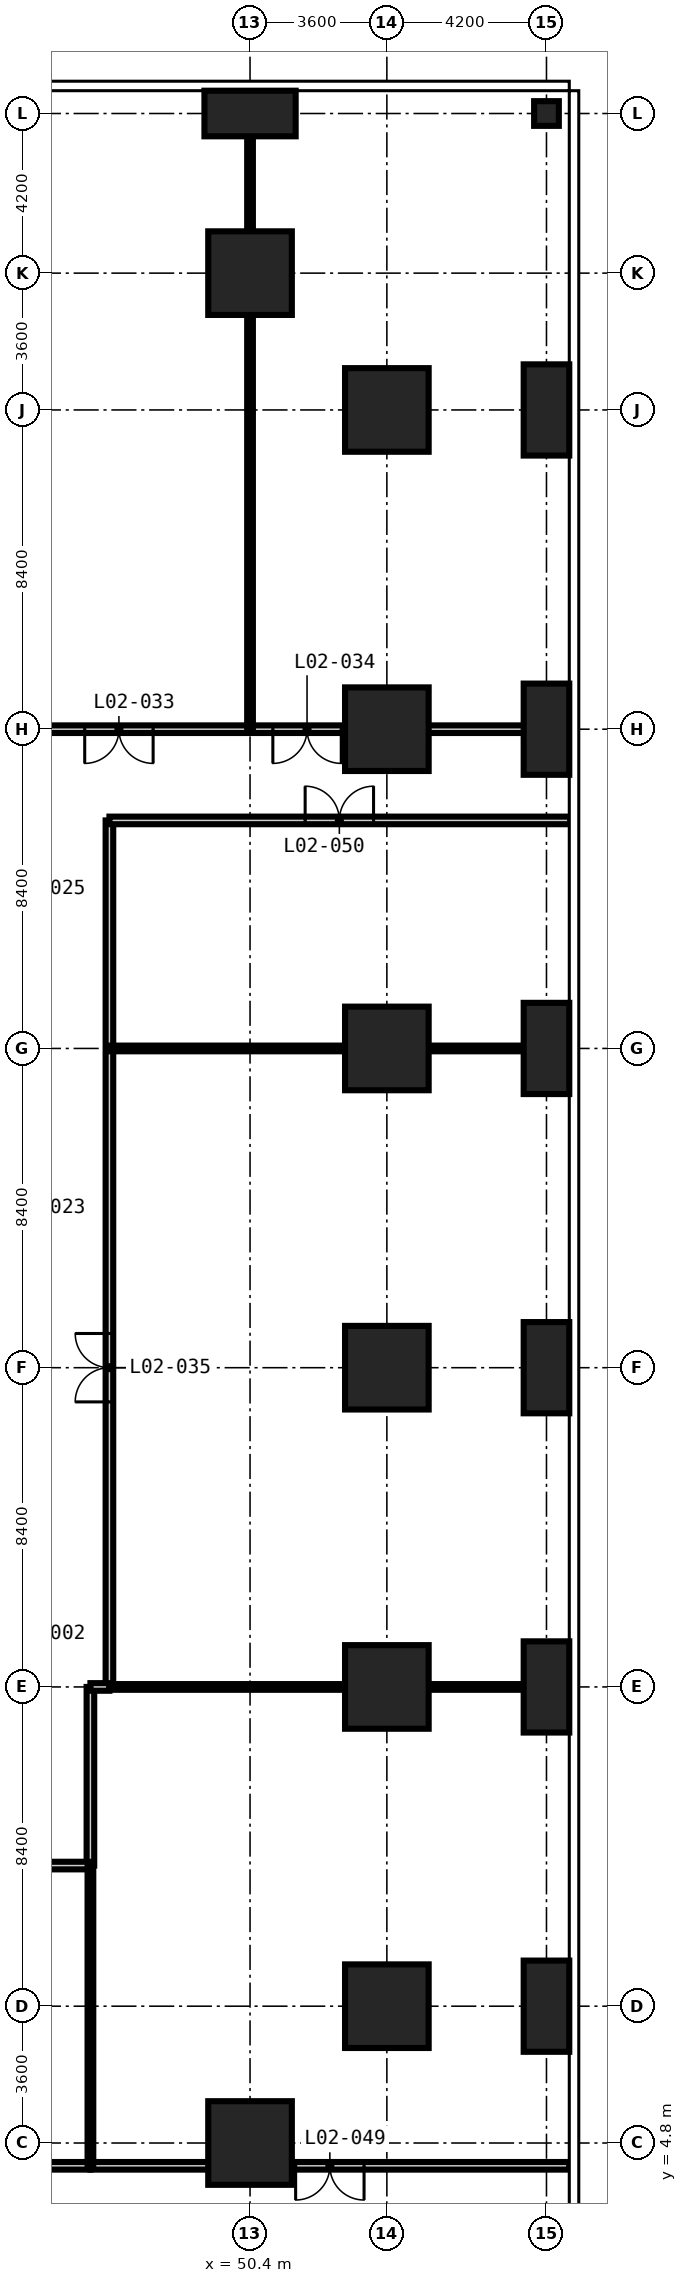
"""IFC4 building model, lengths in metres.
Left out: names, types, materials, properties, quantities, classifications, styles, units other than length and angle.
Written with IfcOpenShell. Run it as: python <this file> out.ifc"""

import sys

from ifc_helpers import new_model, si_unit, direction, frame, frame_2d, origin, origin_2d, place, context, subcontext, project, spatial, rectangle, extrude, element, fill, save


model = new_model("IFC4")
c1 = context("Model", 3, precision=1e-05, world=origin(), true_north=direction((0.0, 1.0)))
c2 = subcontext(c1, "Body", "Model", "MODEL_VIEW")
j1 = project(units=[si_unit("LENGTHUNIT", "METRE"), si_unit("PLANEANGLEUNIT", "RADIAN")], contexts=[c1])
p1 = place(None, origin())
s1 = spatial("IfcSite", under=j1, at=p1, CompositionType="ELEMENT")
p2 = place(p1, origin())
s2 = spatial("IfcBuilding", under=s1, at=p2, CompositionType="ELEMENT")
p3 = place(p2, frame((0.0, 0.0, 12.0)))
s3 = spatial("IfcBuildingStorey", under=s2, at=p3, CompositionType="ELEMENT", Elevation=12.0)
for number, where, z_axis, x_axis in (
    (1, (50.4, 4.8, -0.3), (0.0, 0.0, 1.0), (1.0, 0.0, 0.0)),
    (2, (50.4, 54.0, -0.3), (0.0, 0.0, 1.0), (1.0, 0.0, 0.0)),
):
    element("IfcColumn", number, at=place(p3, frame(where, z_axis=z_axis, x_axis=x_axis)), inside=s3, PredefinedType="COLUMN", context=c2, shape_type="SweptSolid", body=[
        extrude(rectangle(XDim=2.2, YDim=2.2, at=origin_2d()), origin(), (0.0, 0.0, 1.0), 5.0),
    ])
p4 = place(p3, frame((50.4, 58.2, -0.3), z_axis=(0.0, 0.0, 1.0), x_axis=(1.0, 0.0, 0.0)))
e3 = element("IfcColumn", 3, at=p4, inside=s3, PredefinedType="COLUMN", context=c2, shape_type="SweptSolid", body=[
    extrude(rectangle(XDim=2.4, YDim=1.2, at=origin_2d()), origin(), (0.0, 0.0, 1.0), 5.0),
])
for number, where, z_axis, x_axis in (
    (4, (54.0, 8.4, -0.3), (0.0, 0.0, 1.0), (1.0, 0.0, 0.0)),
    (5, (54.0, 16.8, -0.3), (0.0, 0.0, 1.0), (1.0, 0.0, 0.0)),
    (6, (54.0, 25.2, -0.3), (0.0, 0.0, 1.0), (1.0, 0.0, 0.0)),
    (7, (54.0, 33.6, -0.3), (0.0, 0.0, 1.0), (1.0, 0.0, 0.0)),
    (8, (54.0, 42.0, -0.3), (0.0, 0.0, 1.0), (1.0, 0.0, 0.0)),
    (9, (54.0, 50.4, -0.3), (0.0, 0.0, 1.0), (1.0, 0.0, 0.0)),
):
    element("IfcColumn", number, at=place(p3, frame(where, z_axis=z_axis, x_axis=x_axis)), inside=s3, PredefinedType="COLUMN", context=c2, shape_type="SweptSolid", body=[
        extrude(rectangle(XDim=2.2, YDim=2.2, at=origin_2d()), origin(), (0.0, 0.0, 1.0), 5.0),
    ])
for number, where, z_axis, x_axis in (
    (10, (58.2, 8.4, -0.3), (0.0, 0.0, 1.0), (1.0, 0.0, 0.0)),
    (11, (58.2, 16.8, -0.3), (0.0, 0.0, 1.0), (1.0, 0.0, 0.0)),
    (12, (58.2, 25.2, -0.3), (0.0, 0.0, 1.0), (1.0, 0.0, 0.0)),
    (13, (58.2, 33.6, -0.3), (0.0, 0.0, 1.0), (1.0, 0.0, 0.0)),
    (14, (58.2, 42.0, -0.3), (0.0, 0.0, 1.0), (1.0, 0.0, 0.0)),
    (15, (58.2, 50.4, -0.3), (0.0, 0.0, 1.0), (1.0, 0.0, 0.0)),
):
    element("IfcColumn", number, at=place(p3, frame(where, z_axis=z_axis, x_axis=x_axis)), inside=s3, PredefinedType="COLUMN", context=c2, shape_type="SweptSolid", body=[
        extrude(rectangle(XDim=1.2, YDim=2.4, at=origin_2d()), origin(), (0.0, 0.0, 1.0), 5.0),
    ])
p5 = place(p3, frame((58.2, 58.2, -0.3), z_axis=(0.0, 0.0, 1.0), x_axis=(1.0, 0.0, 0.0)))
e16 = element("IfcColumn", 16, at=p5, inside=s3, PredefinedType="COLUMN", context=c2, shape_type="SweptSolid", body=[
    extrude(rectangle(XDim=0.65, YDim=0.65, at=origin_2d()), origin(), (0.0, 0.0, 1.0), 5.0),
])
p6 = place(p3, frame((46.2, 12.1, 0.0), z_axis=(0.0, 0.0, 1.0), x_axis=(0.0, 1.0, 0.0)))
e17 = element("IfcWall", 17, at=p6, inside=s3, PredefinedType="PARTITIONING", context=c2, shape_type="SweptSolid", body=[
    extrude(rectangle(XDim=4.7, YDim=0.2, at=frame_2d((2.35, 0.0))), origin(), (0.0, 0.0, 1.0), 4.7),
])
p7 = place(p3, frame((46.7, 16.8, 0.0), z_axis=(0.0, 0.0, 1.0), x_axis=(0.0, 1.0, 0.0)))
e18 = element("IfcWall", 18, at=p7, inside=s3, PredefinedType="PARTITIONING", context=c2, shape_type="SweptSolid", body=[
    extrude(rectangle(XDim=22.8, YDim=0.2, at=frame_2d((11.4, 0.0))), origin(), (0.0, 0.0, 1.0), 4.7),
])
p8 = place(p7, frame((7.5, 0.0, 0.0)))
e19 = element("IfcOpeningElement", 19, at=p8, cuts=e18, PredefinedType="OPENING", context=c2, shape_type="SweptSolid", body=[
    extrude(rectangle(XDim=1.8, YDim=2.4, at=frame_2d((0.9, 1.2))), frame((0.0, 0.11, 0.0), z_axis=(0.0, -1.0, 0.0), x_axis=(1.0, 0.0, 0.0)), (0.0, 0.0, 1.0), 0.22),
])
p9 = place(p3, frame((0.0, 4.2, 0.0), z_axis=(0.0, 0.0, 1.0), x_axis=(1.0, 0.0, 0.0)))
e20 = element("IfcWall", 20, at=p9, inside=s3, PredefinedType="PARTITIONING", context=c2, shape_type="SweptSolid", body=[
    extrude(rectangle(XDim=46.2, YDim=0.2, at=frame_2d((23.1, 0.0))), origin(), (0.0, 0.0, 1.0), 4.7),
])
p10 = place(p9, frame((5.8, 0.0, 0.0)))
e21 = element("IfcOpeningElement", 21, at=p10, cuts=e20, PredefinedType="OPENING", context=c2, shape_type="SweptSolid", body=[
    extrude(rectangle(XDim=1.0, YDim=2.1, at=frame_2d((0.5, 1.05))), frame((0.0, 0.11, 0.0), z_axis=(0.0, -1.0, 0.0), x_axis=(1.0, 0.0, 0.0)), (0.0, 0.0, 1.0), 0.22),
])
p11 = place(p9, frame((18.4, 0.0, 0.0)))
e22 = element("IfcOpeningElement", 22, at=p11, cuts=e20, PredefinedType="OPENING", context=c2, shape_type="SweptSolid", body=[
    extrude(rectangle(XDim=1.0, YDim=2.1, at=frame_2d((0.5, 1.05))), frame((0.0, 0.11, 0.0), z_axis=(0.0, -1.0, 0.0), x_axis=(1.0, 0.0, 0.0)), (0.0, 0.0, 1.0), 0.22),
])
p12 = place(p9, frame((28.9, 0.0, 0.0)))
e23 = element("IfcOpeningElement", 23, at=p12, cuts=e20, PredefinedType="OPENING", context=c2, shape_type="SweptSolid", body=[
    extrude(rectangle(XDim=1.0, YDim=2.1, at=frame_2d((0.5, 1.05))), frame((0.0, 0.11, 0.0), z_axis=(0.0, -1.0, 0.0), x_axis=(1.0, 0.0, 0.0)), (0.0, 0.0, 1.0), 0.22),
])
p13 = place(p9, frame((39.4, 0.0, 0.0)))
e24 = element("IfcOpeningElement", 24, at=p13, cuts=e20, PredefinedType="OPENING", context=c2, shape_type="SweptSolid", body=[
    extrude(rectangle(XDim=1.0, YDim=2.1, at=frame_2d((0.5, 1.05))), frame((0.0, 0.11, 0.0), z_axis=(0.0, -1.0, 0.0), x_axis=(1.0, 0.0, 0.0)), (0.0, 0.0, 1.0), 0.22),
])
p14 = place(p3, frame((12.6, 12.1, 0.0), z_axis=(0.0, 0.0, 1.0), x_axis=(1.0, 0.0, 0.0)))
e25 = element("IfcWall", 25, at=p14, inside=s3, PredefinedType="PARTITIONING", context=c2, shape_type="SweptSolid", body=[
    extrude(rectangle(XDim=33.6, YDim=0.2, at=frame_2d((16.8, 0.0))), origin(), (0.0, 0.0, 1.0), 4.7),
])
p15 = place(p3, frame((46.2, 16.8, 0.0), z_axis=(0.0, 0.0, 1.0), x_axis=(1.0, 0.0, 0.0)))
e26 = element("IfcWall", 26, at=p15, inside=s3, PredefinedType="PARTITIONING", context=c2, shape_type="SweptSolid", body=[
    extrude(rectangle(XDim=0.5, YDim=0.2, at=frame_2d((0.25, 0.0))), origin(), (0.0, 0.0, 1.0), 4.7),
])
p16 = place(p3, frame((46.7, 39.6, 0.0), z_axis=(0.0, 0.0, 1.0), x_axis=(1.0, 0.0, 0.0)))
e27 = element("IfcWall", 27, at=p16, inside=s3, PredefinedType="PARTITIONING", context=c2, shape_type="SweptSolid", body=[
    extrude(rectangle(XDim=12.123, YDim=0.2, at=frame_2d((6.062, 0.0))), origin(), (0.0, 0.0, 1.0), 4.7),
])
p17 = place(p16, frame((5.15, 0.0, 0.0)))
e28 = element("IfcOpeningElement", 28, at=p17, cuts=e27, PredefinedType="OPENING", context=c2, shape_type="SweptSolid", body=[
    extrude(rectangle(XDim=1.8, YDim=2.4, at=frame_2d((0.9, 1.2))), frame((0.0, 0.11, 0.0), z_axis=(0.0, -1.0, 0.0), x_axis=(1.0, 0.0, 0.0)), (0.0, 0.0, 1.0), 0.22),
])
p18 = place(p3, frame((58.8, 4.2, 0.0), z_axis=(0.0, 0.0, 1.0), x_axis=(-1.0, 0.0, 0.0)))
e29 = element("IfcWall", 29, at=p18, inside=s3, PredefinedType="PARTITIONING", context=c2, shape_type="SweptSolid", body=[
    extrude(rectangle(XDim=12.6, YDim=0.2, at=frame_2d((6.3, 0.0))), origin(), (0.0, 0.0, 1.0), 4.7),
])
p19 = place(p18, frame((5.4, 0.0, 0.0)))
e30 = element("IfcOpeningElement", 30, at=p19, cuts=e29, PredefinedType="OPENING", context=c2, shape_type="SweptSolid", body=[
    extrude(rectangle(XDim=1.8, YDim=2.4, at=frame_2d((0.9, 1.2))), frame((0.0, 0.11, 0.0), z_axis=(0.0, -1.0, 0.0), x_axis=(1.0, 0.0, 0.0)), (0.0, 0.0, 1.0), 0.22),
])
p20 = place(p3, frame((58.8, 42.0, 0.0), z_axis=(0.0, 0.0, 1.0), x_axis=(-1.0, 0.0, 0.0)))
e31 = element("IfcWall", 31, at=p20, inside=s3, PredefinedType="PARTITIONING", context=c2, shape_type="SweptSolid", body=[
    extrude(rectangle(XDim=15.3, YDim=0.2, at=frame_2d((7.65, 0.0))), origin(), (0.0, 0.0, 1.0), 4.7),
])
p21 = place(p20, frame((10.95, 0.0, 0.0)))
e32 = element("IfcOpeningElement", 32, at=p21, cuts=e31, PredefinedType="OPENING", context=c2, shape_type="SweptSolid", body=[
    extrude(rectangle(XDim=1.8, YDim=2.4, at=frame_2d((0.9, 1.2))), frame((0.0, 0.11, 0.0), z_axis=(0.0, -1.0, 0.0), x_axis=(1.0, 0.0, 0.0)), (0.0, 0.0, 1.0), 0.22),
])
p22 = place(p20, frame((6.0, 0.0, 0.0)))
e33 = element("IfcOpeningElement", 33, at=p22, cuts=e31, PredefinedType="OPENING", context=c2, shape_type="SweptSolid", body=[
    extrude(rectangle(XDim=1.8, YDim=2.4, at=frame_2d((0.9, 1.2))), frame((0.0, 0.11, 0.0), z_axis=(0.0, -1.0, 0.0), x_axis=(1.0, 0.0, 0.0)), (0.0, 0.0, 1.0), 0.22),
])
p23 = place(p3, frame((46.2, 4.2, 0.0), z_axis=(0.0, 0.0, 1.0), x_axis=(0.0, 1.0, 0.0)))
e34 = element("IfcWall", 34, at=p23, inside=s3, PredefinedType="PARTITIONING", context=c2, shape_type="SweptSolid", body=[
    extrude(rectangle(XDim=7.9, YDim=0.15, at=frame_2d((3.95, 0.0))), origin(), (0.0, 0.0, 1.0), 4.7),
])
p24 = place(p3, frame((50.4, 42.0, 0.0), z_axis=(0.0, 0.0, 1.0), x_axis=(0.0, 1.0, 0.0)))
e35 = element("IfcWall", 35, at=p24, inside=s3, PredefinedType="PARTITIONING", context=c2, shape_type="SweptSolid", body=[
    extrude(rectangle(XDim=16.8, YDim=0.15, at=frame_2d((8.4, 0.0))), origin(), (0.0, 0.0, 1.0), 4.7),
])
for number, where, z_axis, x_axis in (
    (36, (46.7, 16.8, 0.0), (0.0, 0.0, 1.0), (1.0, 0.0, 0.0)),
    (37, (46.7, 33.6, 0.0), (0.0, 0.0, 1.0), (1.0, 0.0, 0.0)),
):
    element("IfcWall", number, at=place(p3, frame(where, z_axis=z_axis, x_axis=x_axis)), inside=s3, PredefinedType="PARTITIONING", context=c2, shape_type="SweptSolid", body=[
        extrude(rectangle(XDim=12.1, YDim=0.15, at=frame_2d((6.05, 0.0))), origin(), (0.0, 0.0, 1.0), 4.7),
    ])
p25 = place(p21, origin())
e38 = element("IfcDoor", 38, at=p25, inside=s3, OperationType="DOUBLE_DOOR_DOUBLE_SWING", PredefinedType="DOOR", context=c2, shape_type="SweptSolid", body=[
    extrude(rectangle(XDim=1.8, YDim=2.4, at=frame_2d((0.9, 1.2))), frame((0.0, 0.025, 0.0), z_axis=(0.0, -1.0, 0.0), x_axis=(1.0, 0.0, 0.0)), (0.0, 0.0, 1.0), 0.05),
])
fill(e32, e38)
p26 = place(p22, origin())
e39 = element("IfcDoor", 39, at=p26, inside=s3, OperationType="DOUBLE_DOOR_DOUBLE_SWING", PredefinedType="DOOR", context=c2, shape_type="SweptSolid", body=[
    extrude(rectangle(XDim=1.8, YDim=2.4, at=frame_2d((0.9, 1.2))), frame((0.0, 0.025, 0.0), z_axis=(0.0, -1.0, 0.0), x_axis=(1.0, 0.0, 0.0)), (0.0, 0.0, 1.0), 0.05),
])
fill(e33, e39)
p27 = place(p8, origin())
e40 = element("IfcDoor", 40, at=p27, inside=s3, OperationType="DOUBLE_DOOR_DOUBLE_SWING", PredefinedType="DOOR", context=c2, shape_type="SweptSolid", body=[
    extrude(rectangle(XDim=1.8, YDim=2.4, at=frame_2d((0.9, 1.2))), frame((0.0, 0.025, 0.0), z_axis=(0.0, -1.0, 0.0), x_axis=(1.0, 0.0, 0.0)), (0.0, 0.0, 1.0), 0.05),
])
fill(e19, e40)
p28 = place(p19, origin())
e41 = element("IfcDoor", 41, at=p28, inside=s3, OperationType="DOUBLE_DOOR_DOUBLE_SWING", PredefinedType="DOOR", context=c2, shape_type="SweptSolid", body=[
    extrude(rectangle(XDim=1.8, YDim=2.4, at=frame_2d((0.9, 1.2))), frame((0.0, 0.025, 0.0), z_axis=(0.0, -1.0, 0.0), x_axis=(1.0, 0.0, 0.0)), (0.0, 0.0, 1.0), 0.05),
])
fill(e30, e41)
p29 = place(p17, origin())
e42 = element("IfcDoor", 42, at=p29, inside=s3, OperationType="DOUBLE_DOOR_DOUBLE_SWING", PredefinedType="DOOR", context=c2, shape_type="SweptSolid", body=[
    extrude(rectangle(XDim=1.8, YDim=2.4, at=frame_2d((0.9, 1.2))), frame((0.0, 0.025, 0.0), z_axis=(0.0, -1.0, 0.0), x_axis=(1.0, 0.0, 0.0)), (0.0, 0.0, 1.0), 0.05),
])
fill(e28, e42)
save(model, sys.argv[1])
